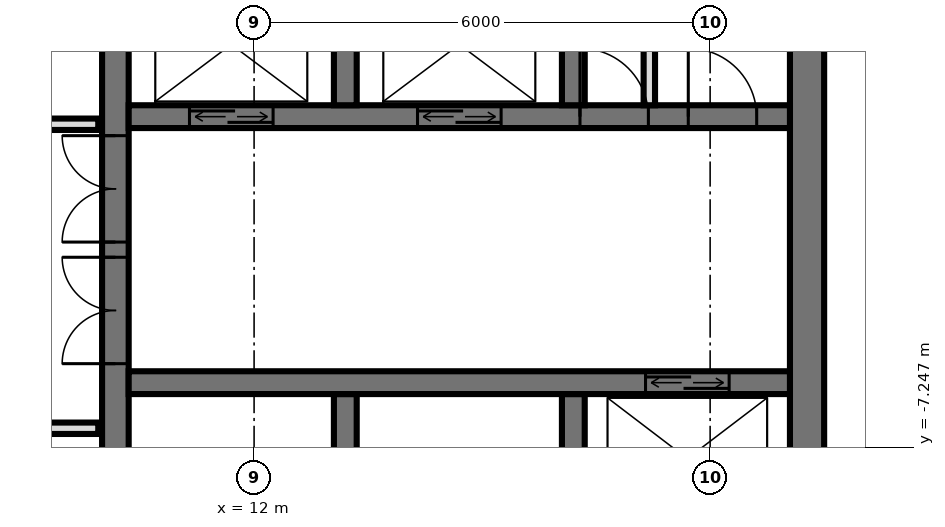
"""IFC4 building model, lengths in metres.
Left out: names, types, materials, properties, quantities, classifications, styles, units other than length and angle.
Written with IfcOpenShell. Run it as: python <this file> out.ifc"""

import sys

from ifc_helpers import new_model, si_unit, direction, frame, frame_2d, origin, place, context, subcontext, project, spatial, rectangle, extrude, element, fill, save


model = new_model("IFC4")
c1 = context("Model", 3, precision=1e-05, world=origin(), true_north=direction((0.0, 1.0)))
c2 = subcontext(c1, "Body", "Model", "MODEL_VIEW")
j1 = project(units=[si_unit("LENGTHUNIT", "METRE"), si_unit("PLANEANGLEUNIT", "RADIAN")], contexts=[c1])
p1 = place(None, origin())
s1 = spatial("IfcSite", under=j1, at=p1, CompositionType="ELEMENT")
p2 = place(p1, origin())
s2 = spatial("IfcBuilding", under=s1, at=p2, CompositionType="ELEMENT")
p3 = place(p2, frame((0.0, 0.0, 252.6)))
s3 = spatial("IfcBuildingStorey", under=s2, at=p3, CompositionType="ELEMENT", Elevation=252.6)
p4 = place(p3, frame((10.175, -14.55, 0.0), z_axis=(0.0, 0.0, 1.0), x_axis=(0.0, 1.0, 0.0)))
e1 = element("IfcWall", 1, at=p4, inside=s3, PredefinedType="SHEAR", context=c2, shape_type="SweptSolid", body=[
    extrude(rectangle(XDim=14.1, YDim=0.35, at=frame_2d((7.05, 0.0))), origin(), (0.0, 0.0, 1.0), 3.5),
])
p5 = place(p4, frame((8.4, 0.0, 0.0)))
e2 = element("IfcOpeningElement", 2, at=p5, cuts=e1, PredefinedType="OPENING", context=c2, shape_type="SweptSolid", body=[
    extrude(rectangle(XDim=1.4, YDim=2.4, at=frame_2d((0.7, 1.2))), frame((0.0, 0.185, 0.0), z_axis=(0.0, -1.0, 0.0), x_axis=(1.0, 0.0, 0.0)), (0.0, 0.0, 1.0), 0.37),
])
p6 = place(p4, frame((10.0, 0.0, 0.0)))
e3 = element("IfcOpeningElement", 3, at=p6, cuts=e1, PredefinedType="OPENING", context=c2, shape_type="SweptSolid", body=[
    extrude(rectangle(XDim=1.4, YDim=2.4, at=frame_2d((0.7, 1.2))), frame((0.0, 0.185, 0.0), z_axis=(0.0, -1.0, 0.0), x_axis=(1.0, 0.0, 0.0)), (0.0, 0.0, 1.0), 0.37),
])
p7 = place(p4, frame((4.0, 0.0, 0.0)))
e4 = element("IfcOpeningElement", 4, at=p7, cuts=e1, PredefinedType="OPENING", context=c2, shape_type="SweptSolid", body=[
    extrude(rectangle(XDim=1.2, YDim=2.1, at=frame_2d((0.6, 1.05))), frame((0.0, 0.185, 0.0), z_axis=(0.0, -1.0, 0.0), x_axis=(1.0, 0.0, 0.0)), (0.0, 0.0, 1.0), 0.37),
])
p8 = place(p3, frame((19.275, -14.55, 0.0), z_axis=(0.0, 0.0, 1.0), x_axis=(0.0, 1.0, 0.0)))
e5 = element("IfcWall", 5, at=p8, inside=s3, PredefinedType="SHEAR", context=c2, shape_type="SweptSolid", body=[
    extrude(rectangle(XDim=14.1, YDim=0.45, at=frame_2d((7.05, 0.0))), origin(), (0.0, 0.0, 1.0), 3.5),
])
p9 = place(p3, frame((10.35, -2.9, 0.0), z_axis=(0.0, 0.0, 1.0), x_axis=(1.0, 0.0, 0.0)))
e6 = element("IfcWall", 6, at=p9, inside=s3, PredefinedType="SHEAR", context=c2, shape_type="SweptSolid", body=[
    extrude(rectangle(XDim=8.7, YDim=0.3, at=frame_2d((4.35, 0.0))), origin(), (0.0, 0.0, 1.0), 3.5),
])
p10 = place(p9, frame((0.8, 0.0, 0.0)))
e7 = element("IfcOpeningElement", 7, at=p10, cuts=e6, PredefinedType="OPENING", context=c2, shape_type="SweptSolid", body=[
    extrude(rectangle(XDim=1.1, YDim=2.1, at=frame_2d((0.55, 1.05))), frame((0.0, 0.16, 0.0), z_axis=(0.0, -1.0, 0.0), x_axis=(1.0, 0.0, 0.0)), (0.0, 0.0, 1.0), 0.32),
])
p11 = place(p9, frame((3.8, 0.0, 0.0)))
e8 = element("IfcOpeningElement", 8, at=p11, cuts=e6, PredefinedType="OPENING", context=c2, shape_type="SweptSolid", body=[
    extrude(rectangle(XDim=1.1, YDim=2.1, at=frame_2d((0.55, 1.05))), frame((0.0, 0.16, 0.0), z_axis=(0.0, -1.0, 0.0), x_axis=(1.0, 0.0, 0.0)), (0.0, 0.0, 1.0), 0.32),
])
p12 = place(p9, frame((5.938, 0.0, 0.0)))
e9 = element("IfcOpeningElement", 9, at=p12, cuts=e6, PredefinedType="OPENING", context=c2, shape_type="SweptSolid", body=[
    extrude(rectangle(XDim=0.9, YDim=2.1, at=frame_2d((0.45, 1.05))), frame((0.0, 0.16, 0.0), z_axis=(0.0, -1.0, 0.0), x_axis=(1.0, 0.0, 0.0)), (0.0, 0.0, 1.0), 0.32),
])
p13 = place(p9, frame((7.363, 0.0, 0.0)))
e10 = element("IfcOpeningElement", 10, at=p13, cuts=e6, PredefinedType="OPENING", context=c2, shape_type="SweptSolid", body=[
    extrude(rectangle(XDim=0.9, YDim=2.1, at=frame_2d((0.45, 1.05))), frame((0.0, 0.16, 0.0), z_axis=(0.0, -1.0, 0.0), x_axis=(1.0, 0.0, 0.0)), (0.0, 0.0, 1.0), 0.32),
])
p14 = place(p3, frame((10.35, -6.4, 0.0), z_axis=(0.0, 0.0, 1.0), x_axis=(1.0, 0.0, 0.0)))
e11 = element("IfcWall", 11, at=p14, inside=s3, PredefinedType="SHEAR", context=c2, shape_type="SweptSolid", body=[
    extrude(rectangle(XDim=8.7, YDim=0.3, at=frame_2d((4.35, 0.0))), origin(), (0.0, 0.0, 1.0), 3.5),
])
p15 = place(p14, frame((6.8, 0.0, 0.0)))
e12 = element("IfcOpeningElement", 12, at=p15, cuts=e11, PredefinedType="OPENING", context=c2, shape_type="SweptSolid", body=[
    extrude(rectangle(XDim=1.1, YDim=2.1, at=frame_2d((0.55, 1.05))), frame((0.0, 0.16, 0.0), z_axis=(0.0, -1.0, 0.0), x_axis=(1.0, 0.0, 0.0)), (0.0, 0.0, 1.0), 0.32),
])
for number, where, z_axis, x_axis in (
    (13, (13.2, -2.75, 0.0), (0.0, 0.0, 1.0), (0.0, 1.0, 0.0)),
    (14, (13.2, -8.85, 0.0), (0.0, 0.0, 1.0), (0.0, 1.0, 0.0)),
    (15, (16.2, -2.75, 0.0), (0.0, 0.0, 1.0), (0.0, 1.0, 0.0)),
    (16, (16.2, -8.85, 0.0), (0.0, 0.0, 1.0), (0.0, 1.0, 0.0)),
):
    element("IfcWall", number, at=place(p3, frame(where, z_axis=z_axis, x_axis=x_axis)), inside=s3, PredefinedType="SHEAR", context=c2, shape_type="SweptSolid", body=[
        extrude(rectangle(XDim=2.3, YDim=0.3, at=frame_2d((1.15, 0.0))), origin(), (0.0, 0.0, 1.0), 3.5),
    ])
p16 = place(p3, frame((17.2, -2.75, 0.0), z_axis=(0.0, 0.0, 1.0), x_axis=(0.0, 1.0, 0.0)))
e17 = element("IfcWall", 17, at=p16, inside=s3, PredefinedType="PARTITIONING", context=c2, shape_type="SweptSolid", body=[
    extrude(rectangle(XDim=2.3, YDim=0.15, at=frame_2d((1.15, 0.0))), origin(), (0.0, 0.0, 1.0), 3.2),
])
p17 = place(p3, frame((-9.95, -7.0, 0.0), z_axis=(0.0, 0.0, 1.0), x_axis=(1.0, 0.0, 0.0)))
e18 = element("IfcWall", 18, at=p17, inside=s3, PredefinedType="PARTITIONING", context=c2, shape_type="SweptSolid", body=[
    extrude(rectangle(XDim=19.9, YDim=0.15, at=frame_2d((9.95, 0.0))), origin(), (0.0, 0.0, 1.0), 3.22),
])
p18 = place(p17, frame((9.45, 0.0, 0.0)))
e19 = element("IfcOpeningElement", 19, at=p18, cuts=e18, PredefinedType="OPENING", context=c2, shape_type="SweptSolid", body=[
    extrude(rectangle(XDim=1.0, YDim=2.1, at=frame_2d((0.5, 1.05))), frame((0.0, 0.085, 0.0), z_axis=(0.0, -1.0, 0.0), x_axis=(1.0, 0.0, 0.0)), (0.0, 0.0, 1.0), 0.17),
])
p19 = place(p17, frame((3.45, 0.0, 0.0)))
e20 = element("IfcOpeningElement", 20, at=p19, cuts=e18, PredefinedType="OPENING", context=c2, shape_type="SweptSolid", body=[
    extrude(rectangle(XDim=1.0, YDim=2.1, at=frame_2d((0.5, 1.05))), frame((0.0, 0.085, 0.0), z_axis=(0.0, -1.0, 0.0), x_axis=(1.0, 0.0, 0.0)), (0.0, 0.0, 1.0), 0.17),
])
p20 = place(p3, frame((-9.95, -3.0, 0.0), z_axis=(0.0, 0.0, 1.0), x_axis=(1.0, 0.0, 0.0)))
e21 = element("IfcWall", 21, at=p20, inside=s3, PredefinedType="PARTITIONING", context=c2, shape_type="SweptSolid", body=[
    extrude(rectangle(XDim=19.9, YDim=0.15, at=frame_2d((9.95, 0.0))), origin(), (0.0, 0.0, 1.0), 3.22),
])
p21 = place(p20, frame((0.95, 0.0, 0.0)))
e22 = element("IfcOpeningElement", 22, at=p21, cuts=e21, PredefinedType="OPENING", context=c2, shape_type="SweptSolid", body=[
    extrude(rectangle(XDim=1.0, YDim=2.1, at=frame_2d((0.5, 1.05))), frame((0.0, 0.085, 0.0), z_axis=(0.0, -1.0, 0.0), x_axis=(1.0, 0.0, 0.0)), (0.0, 0.0, 1.0), 0.17),
])
p22 = place(p20, frame((3.7, 0.0, 0.0)))
e23 = element("IfcOpeningElement", 23, at=p22, cuts=e21, PredefinedType="OPENING", context=c2, shape_type="SweptSolid", body=[
    extrude(rectangle(XDim=1.0, YDim=2.1, at=frame_2d((0.5, 1.05))), frame((0.0, 0.085, 0.0), z_axis=(0.0, -1.0, 0.0), x_axis=(1.0, 0.0, 0.0)), (0.0, 0.0, 1.0), 0.17),
])
p23 = place(p20, frame((8.45, 0.0, 0.0)))
e24 = element("IfcOpeningElement", 24, at=p23, cuts=e21, PredefinedType="OPENING", context=c2, shape_type="SweptSolid", body=[
    extrude(rectangle(XDim=1.0, YDim=2.1, at=frame_2d((0.5, 1.05))), frame((0.0, 0.085, 0.0), z_axis=(0.0, -1.0, 0.0), x_axis=(1.0, 0.0, 0.0)), (0.0, 0.0, 1.0), 0.17),
])
p24 = place(p20, frame((15.7, 0.0, 0.0)))
e25 = element("IfcOpeningElement", 25, at=p24, cuts=e21, PredefinedType="OPENING", context=c2, shape_type="SweptSolid", body=[
    extrude(rectangle(XDim=1.0, YDim=2.1, at=frame_2d((0.5, 1.05))), frame((0.0, 0.085, 0.0), z_axis=(0.0, -1.0, 0.0), x_axis=(1.0, 0.0, 0.0)), (0.0, 0.0, 1.0), 0.17),
])
p25 = place(p10, origin())
e26 = element("IfcDoor", 26, at=p25, inside=s3, OperationType="DOUBLE_DOOR_SLIDING", PredefinedType="USERDEFINED", context=c2, shape_type="SweptSolid", body=[
    extrude(rectangle(XDim=1.1, YDim=2.1, at=frame_2d((0.55, 1.05))), frame((0.0, 0.025, 0.0), z_axis=(0.0, -1.0, 0.0), x_axis=(1.0, 0.0, 0.0)), (0.0, 0.0, 1.0), 0.05),
])
fill(e7, e26)
p26 = place(p11, origin())
e27 = element("IfcDoor", 27, at=p26, inside=s3, OperationType="DOUBLE_DOOR_SLIDING", PredefinedType="USERDEFINED", context=c2, shape_type="SweptSolid", body=[
    extrude(rectangle(XDim=1.1, YDim=2.1, at=frame_2d((0.55, 1.05))), frame((0.0, 0.025, 0.0), z_axis=(0.0, -1.0, 0.0), x_axis=(1.0, 0.0, 0.0)), (0.0, 0.0, 1.0), 0.05),
])
fill(e8, e27)
p27 = place(p15, origin())
e28 = element("IfcDoor", 28, at=p27, inside=s3, OperationType="DOUBLE_DOOR_SLIDING", PredefinedType="USERDEFINED", context=c2, shape_type="SweptSolid", body=[
    extrude(rectangle(XDim=1.1, YDim=2.1, at=frame_2d((0.55, 1.05))), frame((0.0, 0.025, 0.0), z_axis=(0.0, -1.0, 0.0), x_axis=(1.0, 0.0, 0.0)), (0.0, 0.0, 1.0), 0.05),
])
fill(e12, e28)
p28 = place(p5, origin())
e29 = element("IfcDoor", 29, at=p28, inside=s3, OperationType="DOUBLE_DOOR_SINGLE_SWING", PredefinedType="DOOR", context=c2, shape_type="SweptSolid", body=[
    extrude(rectangle(XDim=1.4, YDim=2.4, at=frame_2d((0.7, 1.2))), frame((0.0, 0.025, 0.0), z_axis=(0.0, -1.0, 0.0), x_axis=(1.0, 0.0, 0.0)), (0.0, 0.0, 1.0), 0.05),
])
fill(e2, e29)
p29 = place(p6, origin())
e30 = element("IfcDoor", 30, at=p29, inside=s3, OperationType="DOUBLE_DOOR_SINGLE_SWING", PredefinedType="DOOR", context=c2, shape_type="SweptSolid", body=[
    extrude(rectangle(XDim=1.4, YDim=2.4, at=frame_2d((0.7, 1.2))), frame((0.0, 0.025, 0.0), z_axis=(0.0, -1.0, 0.0), x_axis=(1.0, 0.0, 0.0)), (0.0, 0.0, 1.0), 0.05),
])
fill(e3, e30)
p30 = place(p12, origin())
e31 = element("IfcDoor", 31, at=p30, inside=s3, OperationType="SINGLE_SWING_RIGHT", PredefinedType="DOOR", context=c2, shape_type="SweptSolid", body=[
    extrude(rectangle(XDim=0.9, YDim=2.1, at=frame_2d((0.45, 1.05))), frame((0.0, 0.025, 0.0), z_axis=(0.0, -1.0, 0.0), x_axis=(1.0, 0.0, 0.0)), (0.0, 0.0, 1.0), 0.05),
])
fill(e9, e31)
p31 = place(p13, origin())
e32 = element("IfcDoor", 32, at=p31, inside=s3, OperationType="SINGLE_SWING_RIGHT", PredefinedType="DOOR", context=c2, shape_type="SweptSolid", body=[
    extrude(rectangle(XDim=0.9, YDim=2.1, at=frame_2d((0.45, 1.05))), frame((0.0, 0.025, 0.0), z_axis=(0.0, -1.0, 0.0), x_axis=(1.0, 0.0, 0.0)), (0.0, 0.0, 1.0), 0.05),
])
fill(e10, e32)
save(model, sys.argv[1])
